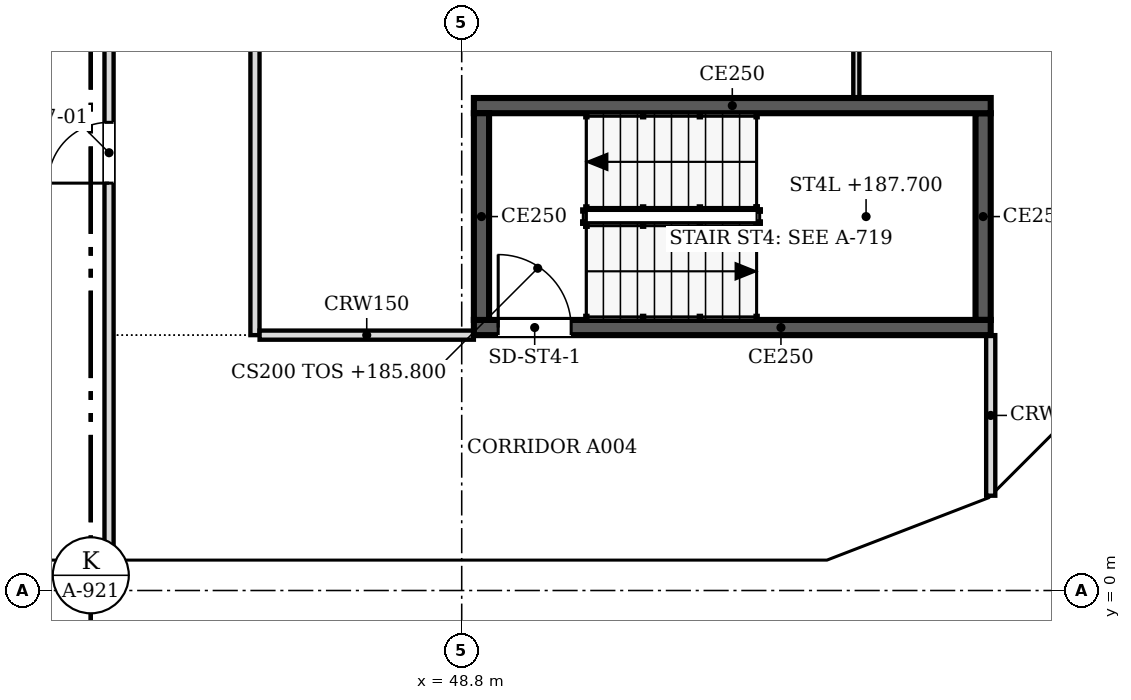
"""IFC4 building model, lengths in metres.
Left out: names, types, materials, properties, quantities, classifications, styles, units other than length and angle.
Written with IfcOpenShell. Run it as: python <this file> out.ifc"""

import sys

from ifc_helpers import new_model, si_unit, direction, frame, frame_2d, origin, place, context, subcontext, project, spatial, polyline, rectangle, outline, extrude, faceted_brep, source, transform, mapped, element, fill, save


model = new_model("IFC4")
c1 = context("Model", 3, precision=1e-05, world=origin(), true_north=direction((0.0, 1.0)))
c2 = subcontext(c1, "Body", "Model", "MODEL_VIEW")
j1 = project(units=[si_unit("LENGTHUNIT", "METRE"), si_unit("PLANEANGLEUNIT", "RADIAN")], contexts=[c1])
p1 = place(None, origin())
s1 = spatial("IfcSite", under=j1, at=p1, CompositionType="ELEMENT")
p2 = place(p1, origin())
s2 = spatial("IfcBuilding", under=s1, at=p2, CompositionType="ELEMENT")
p3 = place(p2, frame((0.0, 0.0, 185.8)))
s3 = spatial("IfcBuildingStorey", under=s2, at=p3, CompositionType="ELEMENT", Elevation=185.8)
m1 = source(origin(), c2, "Body", "SweptSolid", [
    extrude(outline(polyline([(3.05, 0.0), (6.1, 3.8), (3.05, 7.6), (0.0, 3.8), (3.05, 0.0)])), frame((0.0, 0.25, 0.0), z_axis=(0.0, -1.0, 0.0), x_axis=(1.0, 0.0, 0.0)), (0.0, 0.0, 1.0), 0.5),
])
p4 = place(p3, frame((39.65, 0.25, -3.8), z_axis=(0.0, 0.0, 1.0), x_axis=(1.0, 0.0, 0.0)))
e1 = element("IfcWall", 1, at=p4, inside=s3, PredefinedType="SOLIDWALL", context=c2, shape_type="MappedRepresentation", body=[
    mapped(m1, transform((0.0, 0.0, 0.0), scale=1.0)),
])
m2 = source(origin(), c2, "Body", "SweptSolid", [
    extrude(outline(polyline([(3.05, 0.399), (5.78, 3.8), (3.05, 7.201), (0.321, 3.8), (3.05, 0.399)])), frame((0.0, 0.26, 0.0), z_axis=(0.0, -1.0, 0.0), x_axis=(1.0, 0.0, 0.0)), (0.0, 0.0, 1.0), 0.52),
])
p5 = place(p4, origin())
e2 = element("IfcOpeningElement", 2, at=p5, cuts=e1, PredefinedType="OPENING", context=c2, shape_type="MappedRepresentation", body=[
    mapped(m2, transform((0.0, 0.0, 0.0), scale=1.0)),
])
p6 = place(p3, frame((45.75, 0.25, -3.8), z_axis=(0.0, 0.0, 1.0), x_axis=(1.0, 0.0, 0.0)))
e3 = element("IfcWall", 3, at=p6, inside=s3, PredefinedType="SOLIDWALL", context=c2, shape_type="MappedRepresentation", body=[
    mapped(m1, transform((0.0, 0.0, 0.0), scale=1.0)),
])
p7 = place(p6, origin())
e4 = element("IfcOpeningElement", 4, at=p7, cuts=e3, PredefinedType="OPENING", context=c2, shape_type="MappedRepresentation", body=[
    mapped(m2, transform((0.0, 0.0, 0.0), scale=1.0)),
])
m3 = source(origin(), c2, "Body", "Brep", [
    faceted_brep([(3.003, -0.25, 0.0), (3.05, -0.25, 0.06), (3.05, -0.25, 7.54), (3.003, -0.25, 7.6), (0.0, -0.25, 3.8), (0.0, 0.25, 3.8), (2.957, 0.25, 7.541), (2.957, 0.25, 0.059), (3.003, 0.0, 0.0), (3.003, 0.0, 7.6)], [[[0, 1, 2, 3, 4]], [[5, 6, 7]], [[1, 0, 8]], [[9, 3, 2]], [[6, 5, 4, 3, 9]], [[5, 7, 8, 0, 4]], [[1, 8, 7, 6, 9, 2]]]),
])
p8 = place(p3, frame((51.85, 0.25, -3.8), z_axis=(0.0, 0.0, 1.0), x_axis=(1.0, 0.0, 0.0)))
e5 = element("IfcWall", 5, at=p8, inside=s3, PredefinedType="SOLIDWALL", context=c2, shape_type="MappedRepresentation", body=[
    mapped(m3, transform((0.0, 0.0, 0.0), scale=1.0)),
])
m4 = source(origin(), c2, "Body", "SweptSolid", [
    extrude(outline(polyline([(2.803, 6.944), (0.319, 3.8), (2.803, 0.656), (2.803, 6.944)])), frame((0.0, 0.26, 0.0), z_axis=(0.0, -1.0, 0.0), x_axis=(1.0, 0.0, 0.0)), (0.0, 0.0, 1.0), 0.52),
])
p9 = place(p8, origin())
e6 = element("IfcOpeningElement", 6, at=p9, cuts=e5, PredefinedType="OPENING", context=c2, shape_type="MappedRepresentation", body=[
    mapped(m4, transform((0.0, 0.0, 0.0), scale=1.0)),
])
m5 = source(origin(), c2, "Body", "Brep", [
    faceted_brep([(0.047, -0.25, 0.0), (2.997, -0.25, 3.8), (0.047, -0.25, 7.6), (0.0, -0.25, 7.541), (0.0, -0.25, 0.059), (0.093, 0.25, 7.54), (2.944, 0.25, 3.868), (2.944, 0.25, 3.732), (0.093, 0.25, 0.06), (2.997, 0.0, 3.8), (0.047, 0.0, 0.0), (0.047, 0.0, 7.6)], [[[0, 1, 2, 3, 4]], [[5, 6, 7, 8]], [[8, 7, 9, 1, 0, 10]], [[6, 5, 11, 2, 1, 9]], [[3, 2, 11]], [[10, 0, 4]], [[8, 10, 4, 3, 11, 5]], [[9, 7, 6]]]),
])
p10 = place(p3, frame((54.81, 0.233, -3.8), z_axis=(0.0, 0.0, 1.0), x_axis=(0.932990326376, 0.359901446078, 0.0)))
e7 = element("IfcWall", 7, at=p10, inside=s3, PredefinedType="SOLIDWALL", context=c2, shape_type="MappedRepresentation", body=[
    mapped(m5, transform((0.0, 0.0, 0.0), scale=1.0)),
])
m6 = source(origin(), c2, "Body", "SweptSolid", [
    extrude(outline(polyline([(0.247, 0.665), (2.681, 3.8), (0.247, 6.935), (0.247, 0.665)])), frame((0.0, 0.26, 0.0), z_axis=(0.0, -1.0, 0.0), x_axis=(1.0, 0.0, 0.0)), (0.0, 0.0, 1.0), 0.52),
])
p11 = place(p10, origin())
e8 = element("IfcOpeningElement", 8, at=p11, cuts=e7, PredefinedType="OPENING", context=c2, shape_type="MappedRepresentation", body=[
    mapped(m6, transform((0.0, 0.0, 0.0), scale=1.0)),
])
m7 = source(origin(), c2, "Body", "Brep", [
    faceted_brep([(2.944, -0.25, 0.0), (2.997, -0.25, 0.068), (2.997, -0.25, 7.532), (2.944, -0.25, 7.6), (0.0, -0.25, 3.8), (0.053, 0.25, 3.868), (2.891, 0.25, 7.532), (2.891, 0.25, 0.068), (0.053, 0.25, 3.732), (2.944, 0.0, 0.0), (2.944, 0.0, 7.6), (0.0, 0.0, 3.8)], [[[0, 1, 2, 3, 4]], [[5, 6, 7, 8]], [[1, 0, 9]], [[10, 3, 2]], [[6, 5, 11, 4, 3, 10]], [[8, 7, 9, 0, 4, 11]], [[8, 11, 5]], [[1, 9, 7, 6, 10, 2]]]),
])
p12 = place(p3, frame((57.606, 1.312, -3.8), z_axis=(0.0, 0.0, 1.0), x_axis=(0.707147509625, 0.707066050402, 0.0)))
e9 = element("IfcWall", 9, at=p12, inside=s3, PredefinedType="SOLIDWALL", context=c2, shape_type="MappedRepresentation", body=[
    mapped(m7, transform((0.0, 0.0, 0.0), scale=1.0)),
])
m8 = source(origin(), c2, "Body", "SweptSolid", [
    extrude(outline(polyline([(2.744, 6.934), (0.316, 3.8), (2.744, 0.666), (2.744, 6.934)])), frame((0.0, 0.26, 0.0), z_axis=(0.0, -1.0, 0.0), x_axis=(1.0, 0.0, 0.0)), (0.0, 0.0, 1.0), 0.52),
])
p13 = place(p12, origin())
e10 = element("IfcOpeningElement", 10, at=p13, cuts=e9, PredefinedType="OPENING", context=c2, shape_type="MappedRepresentation", body=[
    mapped(m8, transform((0.0, 0.0, 0.0), scale=1.0)),
])
p14 = place(p2, frame((0.0, 0.0, 189.6)))
s4 = spatial("IfcBuildingStorey", under=s2, at=p14, CompositionType="ELEMENT", Elevation=189.6)
m9 = source(origin(), c2, "Body", "Brep", [
    faceted_brep([(3.05, -0.25, 0.0), (6.1, -0.25, 3.8), (6.1, -0.25, 3.8), (3.05, -0.25, 7.6), (0.0, -0.25, 3.8), (0.0, 0.25, 3.8), (3.05, 0.25, 7.6), (6.1, 0.25, 3.8), (6.1, 0.25, 3.8), (3.05, 0.25, 0.0)], [[[0, 1, 2, 3, 4]], [[5, 6, 7, 8, 9]], [[9, 8, 1, 0]], [[7, 6, 3, 2]], [[6, 5, 4, 3]], [[5, 9, 0, 4]], [[1, 8, 7, 2]]]),
])
p15 = place(p14, frame((36.6, 0.25, -3.8), z_axis=(0.0, 0.0, 1.0), x_axis=(1.0, 0.0, 0.0)))
e11 = element("IfcWall", 11, at=p15, inside=s4, PredefinedType="SOLIDWALL", context=c2, shape_type="MappedRepresentation", body=[
    mapped(m9, transform((0.0, 0.0, 0.0), scale=1.0)),
])
m10 = source(origin(), c2, "Body", "SweptSolid", [
    extrude(outline(polyline([(3.05, 0.399), (5.78, 3.8), (3.05, 7.2), (0.321, 3.8), (3.05, 0.399)])), frame((0.0, 0.26, 0.0), z_axis=(0.0, -1.0, 0.0), x_axis=(1.0, 0.0, 0.0)), (0.0, 0.0, 1.0), 0.52),
])
p16 = place(p15, origin())
e12 = element("IfcOpeningElement", 12, at=p16, cuts=e11, PredefinedType="OPENING", context=c2, shape_type="MappedRepresentation", body=[
    mapped(m10, transform((0.0, 0.0, 0.0), scale=1.0)),
])
m11 = source(origin(), c2, "Body", "SweptSolid", [
    extrude(outline(polyline([(3.05, 0.0), (6.1, 3.8), (3.05, 7.6), (0.0, 3.8), (3.05, 0.0)])), frame((0.0, 0.25, 0.0), z_axis=(0.0, -1.0, 0.0), x_axis=(1.0, 0.0, 0.0)), (0.0, 0.0, 1.0), 0.5),
])
p17 = place(p14, frame((42.7, 0.25, -3.8), z_axis=(0.0, 0.0, 1.0), x_axis=(1.0, 0.0, 0.0)))
e13 = element("IfcWall", 13, at=p17, inside=s4, PredefinedType="SOLIDWALL", context=c2, shape_type="MappedRepresentation", body=[
    mapped(m11, transform((0.0, 0.0, 0.0), scale=1.0)),
])
p18 = place(p17, origin())
e14 = element("IfcOpeningElement", 14, at=p18, cuts=e13, PredefinedType="OPENING", context=c2, shape_type="MappedRepresentation", body=[
    mapped(m10, transform((0.0, 0.0, 0.0), scale=1.0)),
])
m12 = source(origin(), c2, "Body", "Brep", [
    faceted_brep([(3.05, -0.25, 0.0), (6.053, -0.25, 3.8), (3.05, -0.25, 7.6), (0.0, -0.25, 3.8), (0.0, 0.25, 3.8), (3.05, 0.25, 7.6), (6.007, 0.25, 3.859), (6.007, 0.25, 3.741), (3.05, 0.25, 0.0), (6.053, 0.0, 3.8)], [[[0, 1, 2, 3]], [[4, 5, 6, 7, 8]], [[8, 7, 9, 1, 0]], [[6, 5, 2, 1, 9]], [[5, 4, 3, 2]], [[4, 8, 0, 3]], [[7, 6, 9]]]),
])
p19 = place(p14, frame((48.8, 0.25, -3.8), z_axis=(0.0, 0.0, 1.0), x_axis=(1.0, 0.0, 0.0)))
e15 = element("IfcWall", 15, at=p19, inside=s4, PredefinedType="SOLIDWALL", context=c2, shape_type="MappedRepresentation", body=[
    mapped(m12, transform((0.0, 0.0, 0.0), scale=1.0)),
])
m13 = source(origin(), c2, "Body", "SweptSolid", [
    extrude(outline(polyline([(3.049, 0.401), (5.735, 3.8), (3.049, 7.199), (0.321, 3.8), (3.049, 0.401)])), frame((0.0, 0.26, 0.0), z_axis=(0.0, -1.0, 0.0), x_axis=(1.0, 0.0, 0.0)), (0.0, 0.0, 1.0), 0.52),
])
p20 = place(p19, origin())
e16 = element("IfcOpeningElement", 16, at=p20, cuts=e15, PredefinedType="OPENING", context=c2, shape_type="MappedRepresentation", body=[
    mapped(m13, transform((0.0, 0.0, 0.0), scale=1.0)),
])
m14 = source(origin(), c2, "Body", "Brep", [
    faceted_brep([(2.95, -0.25, 0.0), (3.003, -0.25, 0.068), (3.003, -0.25, 7.531), (2.95, -0.25, 7.6), (0.0, -0.25, 3.8), (0.047, 0.25, 3.86), (2.898, 0.25, 7.532), (2.898, 0.25, 0.068), (0.047, 0.25, 3.74), (2.95, 0.0, 0.0), (2.95, 0.0, 7.6), (0.0, 0.0, 3.8)], [[[0, 1, 2, 3, 4]], [[5, 6, 7, 8]], [[1, 0, 9]], [[10, 3, 2]], [[6, 5, 11, 4, 3, 10]], [[8, 7, 9, 0, 4, 11]], [[8, 11, 5]], [[1, 9, 7, 6, 10, 2]]]),
])
p21 = place(p14, frame((54.854, 0.25, -3.8), z_axis=(0.0, 0.0, 1.0), x_axis=(0.932970071518, 0.359953949349, 0.0)))
e17 = element("IfcWall", 17, at=p21, inside=s4, PredefinedType="SOLIDWALL", context=c2, shape_type="MappedRepresentation", body=[
    mapped(m14, transform((0.0, 0.0, 0.0), scale=1.0)),
])
m15 = source(origin(), c2, "Body", "SweptSolid", [
    extrude(outline(polyline([(2.75, 6.935), (0.316, 3.8), (2.75, 0.665), (2.75, 6.935)])), frame((0.0, 0.26, 0.0), z_axis=(0.0, -1.0, 0.0), x_axis=(1.0, 0.0, 0.0)), (0.0, 0.0, 1.0), 0.52),
])
p22 = place(p21, origin())
e18 = element("IfcOpeningElement", 18, at=p22, cuts=e17, PredefinedType="OPENING", context=c2, shape_type="MappedRepresentation", body=[
    mapped(m15, transform((0.0, 0.0, 0.0), scale=1.0)),
])
m16 = source(origin(), c2, "Body", "Brep", [
    faceted_brep([(0.053, -0.25, 0.0), (2.997, -0.25, 3.8), (0.053, -0.25, 7.6), (0.0, -0.25, 7.532), (0.0, -0.25, 0.068), (0.106, 0.25, 7.531), (2.944, 0.25, 3.868), (2.944, 0.25, 3.732), (0.106, 0.25, 0.068), (2.997, 0.0, 3.8), (0.053, 0.0, 0.0), (0.053, 0.0, 7.6)], [[[0, 1, 2, 3, 4]], [[5, 6, 7, 8]], [[8, 7, 9, 1, 0, 10]], [[6, 5, 11, 2, 1, 9]], [[3, 2, 11]], [[10, 0, 4]], [[8, 10, 4, 3, 11, 5]], [[7, 6, 9]]]),
])
p23 = place(p14, frame((57.569, 1.274, -3.8), z_axis=(0.0, 0.0, 1.0), x_axis=(0.707066050402, 0.707147509625, 0.0)))
e19 = element("IfcWall", 19, at=p23, inside=s4, PredefinedType="SOLIDWALL", context=c2, shape_type="MappedRepresentation", body=[
    mapped(m16, transform((0.0, 0.0, 0.0), scale=1.0)),
])
m17 = source(origin(), c2, "Body", "SweptSolid", [
    extrude(outline(polyline([(0.253, 0.666), (2.681, 3.8), (0.253, 6.934), (0.253, 0.666)])), frame((0.0, 0.26, 0.0), z_axis=(0.0, -1.0, 0.0), x_axis=(1.0, 0.0, 0.0)), (0.0, 0.0, 1.0), 0.52),
])
p24 = place(p23, origin())
e20 = element("IfcOpeningElement", 20, at=p24, cuts=e19, PredefinedType="OPENING", context=c2, shape_type="MappedRepresentation", body=[
    mapped(m17, transform((0.0, 0.0, 0.0), scale=1.0)),
])
p25 = place(p3, frame((57.5, 4.325, 0.0), z_axis=(0.0, 0.0, 1.0), x_axis=(-1.0, 0.0, 0.0)))
e21 = element("IfcWall", 21, at=p25, inside=s3, PredefinedType="SOLIDWALL", context=c2, shape_type="SweptSolid", body=[
    extrude(rectangle(XDim=8.5, YDim=0.25, at=frame_2d((4.25, 0.0))), origin(), (0.0, 0.0, 1.0), 3.8),
])
m18 = source(origin(), c2, "Body", "SweptSolid", [
    extrude(rectangle(XDim=1.2, YDim=2.1, at=frame_2d((0.6, 1.05))), frame((0.0, 0.135, 0.0), z_axis=(0.0, -1.0, 0.0), x_axis=(1.0, 0.0, 0.0)), (0.0, 0.0, 1.0), 0.27),
])
p26 = place(p25, frame((6.9, 0.0, 0.0)))
e22 = element("IfcOpeningElement", 22, at=p26, cuts=e21, PredefinedType="OPENING", context=c2, shape_type="MappedRepresentation", body=[
    mapped(m18, transform((0.0, 0.0, 0.0), scale=1.0)),
])
p27 = place(p3, frame((49.125, 4.45, 0.0), z_axis=(0.0, 0.0, 1.0), x_axis=(0.0, 1.0, 0.0)))
e23 = element("IfcWall", 23, at=p27, inside=s3, PredefinedType="SOLIDWALL", context=c2, shape_type="SweptSolid", body=[
    extrude(rectangle(XDim=3.4, YDim=0.25, at=frame_2d((1.7, 0.0))), origin(), (0.0, 0.0, 1.0), 3.8),
])
p28 = place(p3, frame((49.0, 7.975, 0.0), z_axis=(0.0, 0.0, 1.0), x_axis=(1.0, 0.0, 0.0)))
e24 = element("IfcWall", 24, at=p28, inside=s3, PredefinedType="SOLIDWALL", context=c2, shape_type="SweptSolid", body=[
    extrude(rectangle(XDim=8.5, YDim=0.25, at=frame_2d((4.25, 0.0))), origin(), (0.0, 0.0, 1.0), 3.8),
])
p29 = place(p3, frame((57.375, 7.85, 0.0), z_axis=(0.0, 0.0, 1.0), x_axis=(0.0, -1.0, 0.0)))
e25 = element("IfcWall", 25, at=p29, inside=s3, PredefinedType="SOLIDWALL", context=c2, shape_type="SweptSolid", body=[
    extrude(rectangle(XDim=3.4, YDim=0.25, at=frame_2d((1.7, 0.0))), origin(), (0.0, 0.0, 1.0), 3.8),
])
p30 = place(p3, frame((43.0, 0.5, 0.0), z_axis=(0.0, 0.0, 1.0), x_axis=(0.0, 1.0, 0.0)))
e26 = element("IfcWall", 26, at=p30, inside=s3, PredefinedType="PARTITIONING", context=c2, shape_type="SweptSolid", body=[
    extrude(rectangle(XDim=21.424, YDim=0.15, at=frame_2d((10.712, 0.0))), origin(), (0.0, 0.0, 1.0), 3.067),
])
m19 = source(origin(), c2, "Body", "SweptSolid", [
    extrude(rectangle(XDim=1.0, YDim=2.1, at=frame_2d((0.5, 1.05))), frame((0.0, 0.085, 0.0), z_axis=(0.0, -1.0, 0.0), x_axis=(1.0, 0.0, 0.0)), (0.0, 0.0, 1.0), 0.17),
])
p31 = place(p30, frame((6.2, 0.0, 0.0)))
e27 = element("IfcOpeningElement", 27, at=p31, cuts=e26, PredefinedType="OPENING", context=c2, shape_type="MappedRepresentation", body=[
    mapped(m19, transform((0.0, 0.0, 0.0), scale=1.0)),
])
p32 = place(p30, frame((15.1, 0.0, 0.0)))
e28 = element("IfcOpeningElement", 28, at=p32, cuts=e26, PredefinedType="OPENING", context=c2, shape_type="MappedRepresentation", body=[
    mapped(m19, transform((0.0, 0.0, 0.0), scale=1.0)),
])
p33 = place(p3, frame((57.5, 1.559, 0.0), z_axis=(0.0, 0.0, 1.0), x_axis=(0.0, 1.0, 0.0)))
e29 = element("IfcWall", 29, at=p33, inside=s3, PredefinedType="PARTITIONING", context=c2, shape_type="SweptSolid", body=[
    extrude(rectangle(XDim=2.641, YDim=0.15, at=frame_2d((1.32, 0.0))), origin(), (0.0, 0.0, 1.0), 3.067),
])
p34 = place(p3, frame((45.4, 21.924, 0.0), z_axis=(0.0, 0.0, 1.0), x_axis=(0.0, -1.0, 0.0)))
e30 = element("IfcWall", 30, at=p34, inside=s3, PredefinedType="PARTITIONING", context=c2, shape_type="SweptSolid", body=[
    extrude(rectangle(XDim=17.724, YDim=0.15, at=frame_2d((8.862, 0.0))), origin(), (0.0, 0.0, 1.0), 3.067),
])
m20 = source(origin(), c2, "Body", "SweptSolid", [
    extrude(rectangle(XDim=0.9, YDim=2.1, at=frame_2d((0.45, 1.05))), frame((0.0, 0.085, 0.0), z_axis=(0.0, -1.0, 0.0), x_axis=(1.0, 0.0, 0.0)), (0.0, 0.0, 1.0), 0.17),
])
p35 = place(p34, frame((1.923, 0.0, 0.0)))
e31 = element("IfcOpeningElement", 31, at=p35, cuts=e30, PredefinedType="OPENING", context=c2, shape_type="MappedRepresentation", body=[
    mapped(m20, transform((0.0, 0.0, 0.0), scale=1.0)),
])
p36 = place(p34, frame((10.824, 0.0, 0.0)))
e32 = element("IfcOpeningElement", 32, at=p36, cuts=e30, PredefinedType="OPENING", context=c2, shape_type="MappedRepresentation", body=[
    mapped(m20, transform((0.0, 0.0, 0.0), scale=1.0)),
])
p37 = place(p3, frame((45.476, 4.2, 0.0), z_axis=(0.0, 0.0, 1.0), x_axis=(1.0, 0.0, 0.0)))
e33 = element("IfcWall", 33, at=p37, inside=s3, PredefinedType="PARTITIONING", context=c2, shape_type="SweptSolid", body=[
    extrude(rectangle(XDim=3.524, YDim=0.15, at=frame_2d((1.762, 0.0))), origin(), (0.0, 0.0, 1.0), 3.067),
])
p38 = place(p3, frame((55.29, 12.397, 0.0), z_axis=(0.0, 0.0, 1.0), x_axis=(0.0, -1.0, 0.0)))
e34 = element("IfcWall", 34, at=p38, inside=s3, PredefinedType="PARTITIONING", context=c2, shape_type="SweptSolid", body=[
    extrude(rectangle(XDim=4.297, YDim=0.1, at=frame_2d((2.148, 0.0))), origin(), (0.0, 0.0, 1.0), 3.067),
])
m21 = source(origin(), c2, "Body", "SweptSolid", [
    extrude(rectangle(XDim=0.9, YDim=2.1, at=frame_2d((0.45, 1.05))), frame((0.0, 0.06, 0.0), z_axis=(0.0, -1.0, 0.0), x_axis=(1.0, 0.0, 0.0)), (0.0, 0.0, 1.0), 0.12),
])
p39 = place(p38, frame((1.697, 0.0, 0.0)))
e35 = element("IfcOpeningElement", 35, at=p39, cuts=e34, PredefinedType="OPENING", context=c2, shape_type="MappedRepresentation", body=[
    mapped(m21, transform((0.0, 0.0, 0.0), scale=1.0)),
])
m22 = source(origin(), c2, "Body", "SweptSolid", [
    extrude(rectangle(XDim=1.2, YDim=2.1, at=frame_2d((0.6, 1.05))), frame((0.0, 0.025, 0.0), z_axis=(0.0, -1.0, 0.0), x_axis=(1.0, 0.0, 0.0)), (0.0, 0.0, 1.0), 0.05),
])
p40 = place(p26, origin())
e36 = element("IfcDoor", 36, at=p40, inside=s3, OperationType="SINGLE_SWING_RIGHT", PredefinedType="DOOR", context=c2, shape_type="MappedRepresentation", body=[
    mapped(m22, transform((0.0, 0.0, 0.0), scale=1.0)),
])
fill(e22, e36)
m23 = source(origin(), c2, "Body", "SweptSolid", [
    extrude(rectangle(XDim=1.0, YDim=2.1, at=frame_2d((0.5, 1.05))), frame((0.0, 0.025, 0.0), z_axis=(0.0, -1.0, 0.0), x_axis=(1.0, 0.0, 0.0)), (0.0, 0.0, 1.0), 0.05),
])
p41 = place(p31, origin())
e37 = element("IfcDoor", 37, at=p41, inside=s3, OperationType="SINGLE_SWING_LEFT", PredefinedType="DOOR", context=c2, shape_type="MappedRepresentation", body=[
    mapped(m23, transform((0.0, 0.0, 0.0), scale=1.0)),
])
fill(e27, e37)
save(model, sys.argv[1])
